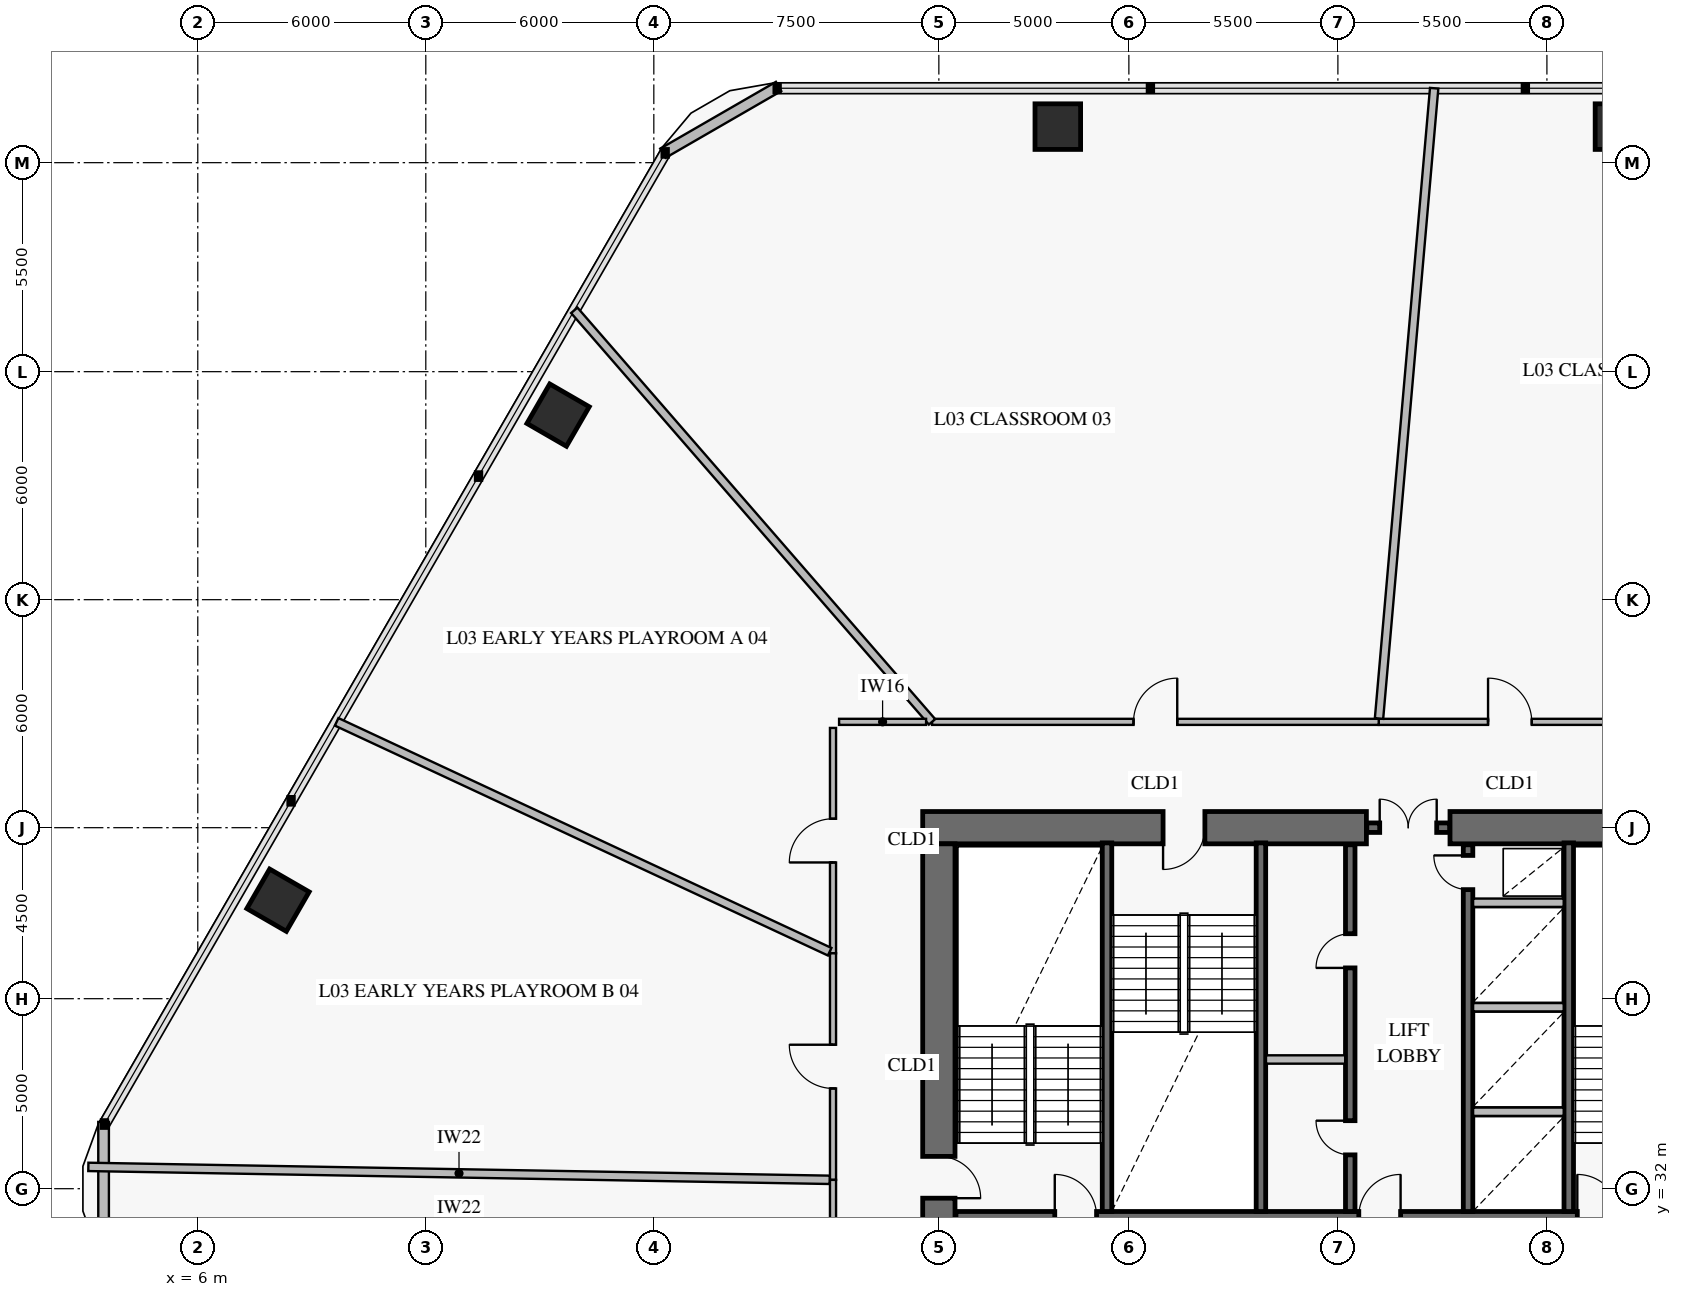
"""IFC4 building model, lengths in metres.
Left out: names, types, materials, properties, quantities, classifications, styles, units other than length and angle.
Written with IfcOpenShell. Run it as: python <this file> out.ifc"""

import sys

from ifc_helpers import new_model, si_unit, direction, frame, frame_2d, origin, origin_2d, place, context, subcontext, project, spatial, rectangle, extrude, element, fill, save


model = new_model("IFC4")
c1 = context("Model", 3, precision=1e-05, world=origin(), true_north=direction((0.0, 1.0)))
c2 = subcontext(c1, "Body", "Model", "MODEL_VIEW")
j1 = project(units=[si_unit("LENGTHUNIT", "METRE"), si_unit("PLANEANGLEUNIT", "RADIAN")], contexts=[c1])
p1 = place(None, origin())
s1 = spatial("IfcSite", under=j1, at=p1, CompositionType="ELEMENT")
p2 = place(p1, origin())
s2 = spatial("IfcBuilding", under=s1, at=p2, CompositionType="ELEMENT")
p3 = place(p2, frame((0.0, 0.0, 12.0)))
s3 = spatial("IfcBuildingStorey", under=s2, at=p3, CompositionType="ELEMENT", Elevation=12.0)
p4 = place(p3, frame((46.925, 41.5, 0.0), z_axis=(0.0, 0.0, 1.0), x_axis=(-1.0, 0.0, 0.0)))
e1 = element("IfcWall", 1, at=p4, inside=s3, PredefinedType="SHEAR", context=c2, shape_type="SweptSolid", body=[
    extrude(rectangle(XDim=7.975, YDim=0.85, at=frame_2d((3.988, 0.0))), origin(), (0.0, 0.0, 1.0), 4.2),
])
p5 = place(p3, frame((36.75, 41.5, 0.0), z_axis=(0.0, 0.0, 1.0), x_axis=(-1.0, 0.0, 0.0)))
e2 = element("IfcWall", 2, at=p5, inside=s3, PredefinedType="SHEAR", context=c2, shape_type="SweptSolid", body=[
    extrude(rectangle(XDim=11.675, YDim=0.85, at=frame_2d((5.837, 0.0))), origin(), (0.0, 0.0, 1.0), 4.2),
])
p6 = place(p5, frame((4.25, 0.0, 0.0)))
e3 = element("IfcOpeningElement", 3, at=p6, cuts=e2, PredefinedType="OPENING", context=c2, shape_type="SweptSolid", body=[
    extrude(rectangle(XDim=1.1, YDim=2.15, at=frame_2d((0.55, 1.075))), frame((0.0, 0.437, 0.0), z_axis=(0.0, -1.0, 0.0), x_axis=(1.0, 0.0, 0.0)), (0.0, 0.0, 1.0), 0.874),
])
p7 = place(p3, frame((25.5, 22.925, 0.0), z_axis=(0.0, 0.0, 1.0), x_axis=(0.0, 1.0, 0.0)))
e4 = element("IfcWall", 4, at=p7, inside=s3, PredefinedType="SHEAR", context=c2, shape_type="SweptSolid", body=[
    extrude(rectangle(XDim=18.15, YDim=0.85, at=frame_2d((9.075, 0.0))), origin(), (0.0, 0.0, 1.0), 4.2),
])
p8 = place(p7, frame((8.825, 0.0, 0.0)))
e5 = element("IfcOpeningElement", 5, at=p8, cuts=e4, PredefinedType="OPENING", context=c2, shape_type="SweptSolid", body=[
    extrude(rectangle(XDim=1.1, YDim=2.15, at=frame_2d((0.55, 1.075))), frame((0.0, 0.437, 0.0), z_axis=(0.0, -1.0, 0.0), x_axis=(1.0, 0.0, 0.0)), (0.0, 0.0, 1.0), 0.874),
])
for number, where, z_axis, x_axis in (
    (6, (43.37, 59.948, 0.0), (0.0, 0.0, 1.0), (-1.0, 0.0, 0.0)),
    (7, (28.63, 59.948, 0.0), (0.0, 0.0, 1.0), (-1.0, 0.0, 0.0)),
    (8, (15.481, 52.357, 0.0), (0.0, 0.0, 1.0), (-0.5, -0.866, 0.0)),
    (9, (8.111, 39.592, 0.0), (0.0, 0.0, 1.0), (-0.5, -0.866, 0.0)),
):
    element("IfcColumn", number, at=place(p3, frame(where, z_axis=z_axis, x_axis=x_axis)), inside=s3, PredefinedType="COLUMN", context=c2, shape_type="SweptSolid", body=[
        extrude(rectangle(XDim=1.2, YDim=1.2, at=origin_2d()), origin(), (0.0, 0.0, 1.0), 3.92),
    ])
p9 = place(p3, frame((3.521, 30.242, 0.0), z_axis=(0.0, 0.0, 1.0), x_axis=(0.0, 1.0, 0.0)))
e10 = element("IfcWall", 10, at=p9, inside=s3, PredefinedType="SOLIDWALL", context=c2, shape_type="SweptSolid", body=[
    extrude(rectangle(XDim=3.515, YDim=0.28, at=frame_2d((1.758, 0.0))), origin(), (0.0, 0.0, 1.0), 3.92),
])
p10 = place(p3, frame((18.239, 59.249, 0.0), z_axis=(0.0, 0.0, 1.0), x_axis=(0.866007452331, 0.500031091541, 0.0)))
e11 = element("IfcWall", 11, at=p10, inside=s3, PredefinedType="SOLIDWALL", context=c2, shape_type="SweptSolid", body=[
    extrude(rectangle(XDim=3.515, YDim=0.28, at=frame_2d((1.757, 0.0))), origin(), (0.0, 0.0, 1.0), 3.92),
])
p11 = place(p3, frame((36.76, 41.5, 0.0), z_axis=(0.0, 0.0, 1.0), x_axis=(1.0, 0.0, 0.0)))
e12 = element("IfcWall", 12, at=p11, inside=s3, PredefinedType="SOLIDWALL", context=c2, shape_type="SweptSolid", body=[
    extrude(rectangle(XDim=2.18, YDim=0.25, at=frame_2d((1.09, 0.0))), origin(), (0.0, 0.0, 1.0), 4.2),
])
p12 = place(p11, frame((0.34, 0.0, 0.0)))
e13 = element("IfcOpeningElement", 13, at=p12, cuts=e12, PredefinedType="OPENING", context=c2, shape_type="SweptSolid", body=[
    extrude(rectangle(XDim=1.5, YDim=2.15, at=frame_2d((0.75, 1.075))), frame((0.0, 0.137, 0.0), z_axis=(0.0, -1.0, 0.0), x_axis=(1.0, 0.0, 0.0)), (0.0, 0.0, 1.0), 0.274),
])
p13 = place(p3, frame((25.95, 31.275, 0.0), z_axis=(0.0, 0.0, 1.0), x_axis=(1.0, 0.0, 0.0)))
e14 = element("IfcWall", 14, at=p13, inside=s3, PredefinedType="SOLIDWALL", context=c2, shape_type="SweptSolid", body=[
    extrude(rectangle(XDim=20.1, YDim=0.25, at=frame_2d((10.05, 0.0))), origin(), (0.0, 0.0, 1.0), 4.2),
])
p14 = place(p13, frame((2.6, 0.0, 0.0)))
e15 = element("IfcOpeningElement", 15, at=p14, cuts=e14, PredefinedType="OPENING", context=c2, shape_type="SweptSolid", body=[
    extrude(rectangle(XDim=1.1, YDim=2.15, at=frame_2d((0.55, 1.075))), frame((0.0, 0.137, 0.0), z_axis=(0.0, -1.0, 0.0), x_axis=(1.0, 0.0, 0.0)), (0.0, 0.0, 1.0), 0.274),
])
p15 = place(p13, frame((10.6, 0.0, 0.0)))
e16 = element("IfcOpeningElement", 16, at=p15, cuts=e14, PredefinedType="OPENING", context=c2, shape_type="SweptSolid", body=[
    extrude(rectangle(XDim=1.1, YDim=2.15, at=frame_2d((0.55, 1.075))), frame((0.0, 0.137, 0.0), z_axis=(0.0, -1.0, 0.0), x_axis=(1.0, 0.0, 0.0)), (0.0, 0.0, 1.0), 0.274),
])
p16 = place(p13, frame((16.35, 0.0, 0.0)))
e17 = element("IfcOpeningElement", 17, at=p16, cuts=e14, PredefinedType="OPENING", context=c2, shape_type="SweptSolid", body=[
    extrude(rectangle(XDim=1.1, YDim=2.15, at=frame_2d((0.55, 1.075))), frame((0.0, 0.137, 0.0), z_axis=(0.0, -1.0, 0.0), x_axis=(1.0, 0.0, 0.0)), (0.0, 0.0, 1.0), 0.274),
])
for number, where, z_axis, x_axis in (
    (18, (29.925, 31.4, 0.0), (0.0, 0.0, 1.0), (0.0, 1.0, 0.0)),
    (19, (33.975, 31.4, 0.0), (0.0, 0.0, 1.0), (0.0, 1.0, 0.0)),
    (20, (42.075, 31.4, 0.0), (0.0, 0.0, 1.0), (0.0, 1.0, 0.0)),
):
    element("IfcWall", number, at=place(p3, frame(where, z_axis=z_axis, x_axis=x_axis)), inside=s3, PredefinedType="SOLIDWALL", context=c2, shape_type="SweptSolid", body=[
        extrude(rectangle(XDim=9.7, YDim=0.25, at=frame_2d((4.85, 0.0))), origin(), (0.0, 0.0, 1.0), 4.2),
    ])
p17 = place(p3, frame((36.325, 31.4, 0.0), z_axis=(0.0, 0.0, 1.0), x_axis=(0.0, 1.0, 0.0)))
e21 = element("IfcWall", 21, at=p17, inside=s3, PredefinedType="SOLIDWALL", context=c2, shape_type="SweptSolid", body=[
    extrude(rectangle(XDim=9.65, YDim=0.25, at=frame_2d((4.825, 0.0))), origin(), (0.0, 0.0, 1.0), 4.2),
])
p18 = place(p17, frame((1.49, 0.0, 0.0)))
e22 = element("IfcOpeningElement", 22, at=p18, cuts=e21, PredefinedType="OPENING", context=c2, shape_type="SweptSolid", body=[
    extrude(rectangle(XDim=0.9, YDim=2.1, at=frame_2d((0.45, 1.05))), frame((0.0, 0.137, 0.0), z_axis=(0.0, -1.0, 0.0), x_axis=(1.0, 0.0, 0.0)), (0.0, 0.0, 1.0), 0.274),
])
p19 = place(p17, frame((6.41, 0.0, 0.0)))
e23 = element("IfcOpeningElement", 23, at=p19, cuts=e21, PredefinedType="OPENING", context=c2, shape_type="SweptSolid", body=[
    extrude(rectangle(XDim=0.9, YDim=2.1, at=frame_2d((0.45, 1.05))), frame((0.0, 0.137, 0.0), z_axis=(0.0, -1.0, 0.0), x_axis=(1.0, 0.0, 0.0)), (0.0, 0.0, 1.0), 0.274),
])
p20 = place(p3, frame((39.425, 31.4, 0.0), z_axis=(0.0, 0.0, 1.0), x_axis=(0.0, 1.0, 0.0)))
e24 = element("IfcWall", 24, at=p20, inside=s3, PredefinedType="SOLIDWALL", context=c2, shape_type="SweptSolid", body=[
    extrude(rectangle(XDim=9.65, YDim=0.25, at=frame_2d((4.825, 0.0))), origin(), (0.0, 0.0, 1.0), 4.2),
])
p21 = place(p20, frame((8.47, 0.0, 0.0)))
e25 = element("IfcOpeningElement", 25, at=p21, cuts=e24, PredefinedType="OPENING", context=c2, shape_type="SweptSolid", body=[
    extrude(rectangle(XDim=0.9, YDim=2.1, at=frame_2d((0.45, 1.05))), frame((0.0, 0.137, 0.0), z_axis=(0.0, -1.0, 0.0), x_axis=(1.0, 0.0, 0.0)), (0.0, 0.0, 1.0), 0.274),
])
p22 = place(p3, frame((43.978, 44.285, 0.0), z_axis=(0.0, 0.0, 1.0), x_axis=(-1.0, 0.0, 0.0)))
e26 = element("IfcWall", 26, at=p22, inside=s3, PredefinedType="PARTITIONING", context=c2, shape_type="SweptSolid", body=[
    extrude(rectangle(XDim=6.903, YDim=0.16, at=frame_2d((3.452, 0.0))), origin(), (0.0, 0.0, 1.0), 3.22),
])
p23 = place(p22, frame((2.877, 0.0, 0.0)))
e27 = element("IfcOpeningElement", 27, at=p23, cuts=e26, PredefinedType="OPENING", context=c2, shape_type="SweptSolid", body=[
    extrude(rectangle(XDim=1.15, YDim=2.2, at=frame_2d((0.575, 1.1))), frame((0.0, 0.092, 0.0), z_axis=(0.0, -1.0, 0.0), x_axis=(1.0, 0.0, 0.0)), (0.0, 0.0, 1.0), 0.184),
])
p24 = place(p3, frame((37.075, 44.285, 0.0), z_axis=(0.0, 0.0, 1.0), x_axis=(-1.0, 0.0, 0.0)))
e28 = element("IfcWall", 28, at=p24, inside=s3, PredefinedType="PARTITIONING", context=c2, shape_type="SweptSolid", body=[
    extrude(rectangle(XDim=11.754, YDim=0.16, at=frame_2d((5.877, 0.0))), origin(), (0.0, 0.0, 1.0), 3.22),
])
p25 = place(p24, frame((5.302, 0.0, 0.0)))
e29 = element("IfcOpeningElement", 29, at=p25, cuts=e28, PredefinedType="OPENING", context=c2, shape_type="SweptSolid", body=[
    extrude(rectangle(XDim=1.15, YDim=2.2, at=frame_2d((0.575, 1.1))), frame((0.0, 0.092, 0.0), z_axis=(0.0, -1.0, 0.0), x_axis=(1.0, 0.0, 0.0)), (0.0, 0.0, 1.0), 0.184),
])
p26 = place(p3, frame((22.715, 44.125, 0.0), z_axis=(0.0, 0.0, 1.0), x_axis=(0.0, -1.0, 0.0)))
e30 = element("IfcWall", 30, at=p26, inside=s3, PredefinedType="PARTITIONING", context=c2, shape_type="SweptSolid", body=[
    extrude(rectangle(XDim=5.93, YDim=0.16, at=frame_2d((2.965, 0.0))), origin(), (0.0, 0.0, 1.0), 3.92),
])
p27 = place(p26, frame((2.39, 0.0, 0.0)))
e31 = element("IfcOpeningElement", 31, at=p27, cuts=e30, PredefinedType="OPENING", context=c2, shape_type="SweptSolid", body=[
    extrude(rectangle(XDim=1.15, YDim=2.2, at=frame_2d((0.575, 1.1))), frame((0.0, 0.092, 0.0), z_axis=(0.0, -1.0, 0.0), x_axis=(1.0, 0.0, 0.0)), (0.0, 0.0, 1.0), 0.184),
])
p28 = place(p3, frame((22.715, 38.195, 0.0), z_axis=(0.0, 0.0, 1.0), x_axis=(0.0, -1.0, 0.0)))
e32 = element("IfcWall", 32, at=p28, inside=s3, PredefinedType="PARTITIONING", context=c2, shape_type="SweptSolid", body=[
    extrude(rectangle(XDim=5.963, YDim=0.16, at=frame_2d((2.981, 0.0))), origin(), (0.0, 0.0, 1.0), 3.22),
])
p29 = place(p28, frame((2.406, 0.0, 0.0)))
e33 = element("IfcOpeningElement", 33, at=p29, cuts=e32, PredefinedType="OPENING", context=c2, shape_type="SweptSolid", body=[
    extrude(rectangle(XDim=1.15, YDim=2.2, at=frame_2d((0.575, 1.1))), frame((0.0, 0.092, 0.0), z_axis=(0.0, -1.0, 0.0), x_axis=(1.0, 0.0, 0.0)), (0.0, 0.0, 1.0), 0.184),
])
p30 = place(p3, frame((22.715, 32.232, 0.0), z_axis=(0.0, 0.0, 1.0), x_axis=(0.0, -1.0, 0.0)))
e34 = element("IfcWall", 34, at=p30, inside=s3, PredefinedType="PARTITIONING", context=c2, shape_type="SweptSolid", body=[
    extrude(rectangle(XDim=5.599, YDim=0.16, at=frame_2d((2.8, 0.0))), origin(), (0.0, 0.0, 1.0), 3.22),
])
p31 = place(p30, frame((2.225, 0.0, 0.0)))
e35 = element("IfcOpeningElement", 35, at=p31, cuts=e34, PredefinedType="OPENING", context=c2, shape_type="SweptSolid", body=[
    extrude(rectangle(XDim=1.15, YDim=2.2, at=frame_2d((0.575, 1.1))), frame((0.0, 0.092, 0.0), z_axis=(0.0, -1.0, 0.0), x_axis=(1.0, 0.0, 0.0)), (0.0, 0.0, 1.0), 0.184),
])
p32 = place(p3, frame((34.108, 35.4, 0.0), z_axis=(0.0, 0.0, 1.0), x_axis=(1.0, 0.0, 0.0)))
e36 = element("IfcWall", 36, at=p32, inside=s3, PredefinedType="PARTITIONING", context=c2, shape_type="SweptSolid", body=[
    extrude(rectangle(XDim=2.084, YDim=0.22, at=frame_2d((1.042, 0.0))), origin(), (0.0, 0.0, 1.0), 3.92),
])
for number, where, z_axis, x_axis in (
    (37, (39.558, 34.025, 0.0), (0.0, 0.0, 1.0), (1.0, 0.0, 0.0)),
    (38, (39.558, 36.775, 0.0), (0.0, 0.0, 1.0), (1.0, 0.0, 0.0)),
    (39, (39.558, 39.525, 0.0), (0.0, 0.0, 1.0), (1.0, 0.0, 0.0)),
):
    element("IfcWall", number, at=place(p3, frame(where, z_axis=z_axis, x_axis=x_axis)), inside=s3, PredefinedType="PARTITIONING", context=c2, shape_type="SweptSolid", body=[
        extrude(rectangle(XDim=2.384, YDim=0.22, at=frame_2d((1.192, 0.0))), origin(), (0.0, 0.0, 1.0), 3.92),
    ])
p33 = place(p3, frame((37.083, 44.373, 0.0), z_axis=(0.0, 0.0, 1.0), x_axis=(0.087149123156, 0.996195277209, 0.0)))
e40 = element("IfcWall", 40, at=p33, inside=s3, PredefinedType="PARTITIONING", context=c2, shape_type="SweptSolid", body=[
    extrude(rectangle(XDim=16.649, YDim=0.22, at=frame_2d((8.324, 0.0))), origin(), (0.0, 0.0, 1.0), 3.17),
])
p34 = place(p3, frame((25.321, 44.285, 0.0), z_axis=(0.0, 0.0, 1.0), x_axis=(-0.656060762546, 0.754708073263, 0.0)))
e41 = element("IfcWall", 41, at=p34, inside=s3, PredefinedType="PARTITIONING", context=c2, shape_type="SweptSolid", body=[
    extrude(rectangle(XDim=14.349, YDim=0.22, at=frame_2d((7.175, 0.0))), origin(), (0.0, 0.0, 1.0), 3.17),
])
p35 = place(p3, frame((22.627, 38.236, 0.0), z_axis=(0.0, 0.0, 1.0), x_axis=(-0.906309468756, 0.422614655263, 0.0)))
e42 = element("IfcWall", 42, at=p35, inside=s3, PredefinedType="PARTITIONING", context=c2, shape_type="SweptSolid", body=[
    extrude(rectangle(XDim=14.313, YDim=0.22, at=frame_2d((7.157, 0.0))), origin(), (0.0, 0.0, 1.0), 3.17),
])
p36 = place(p3, frame((25.164, 44.285, 0.0), z_axis=(0.0, 0.0, 1.0), x_axis=(-1.0, 0.0, 0.0)))
e43 = element("IfcWall", 43, at=p36, inside=s3, PredefinedType="PARTITIONING", context=c2, shape_type="SweptSolid", body=[
    extrude(rectangle(XDim=2.289, YDim=0.16, at=frame_2d((1.145, 0.0))), origin(), (0.0, 0.0, 1.0), 3.22),
])
p37 = place(p3, frame((22.627, 32.233, 0.0), z_axis=(0.0, 0.0, 1.0), x_axis=(-0.999847613209, 0.017457100559, 0.0)))
e44 = element("IfcWall", 44, at=p37, inside=s3, PredefinedType="PARTITIONING", context=c2, shape_type="SweptSolid", body=[
    extrude(rectangle(XDim=19.509, YDim=0.22, at=frame_2d((9.755, 0.0))), origin(), (0.0, 0.0, 1.0), 3.17),
])
p38 = place(p8, frame((1.1, 0.0, 0.0), z_axis=(0.0, 0.0, 1.0), x_axis=(-1.0, 0.0, 0.0)))
e45 = element("IfcDoor", 45, at=p38, inside=s3, OperationType="SINGLE_SWING_RIGHT", PredefinedType="USERDEFINED", context=c2, shape_type="SweptSolid", body=[
    extrude(rectangle(XDim=1.1, YDim=2.15, at=frame_2d((0.55, 1.075))), frame((0.0, 0.025, 0.0), z_axis=(0.0, -1.0, 0.0), x_axis=(1.0, 0.0, 0.0)), (0.0, 0.0, 1.0), 0.05),
])
fill(e5, e45)
p39 = place(p6, origin())
e46 = element("IfcDoor", 46, at=p39, inside=s3, OperationType="SINGLE_SWING_RIGHT", PredefinedType="USERDEFINED", context=c2, shape_type="SweptSolid", body=[
    extrude(rectangle(XDim=1.1, YDim=2.15, at=frame_2d((0.55, 1.075))), frame((0.0, 0.025, 0.0), z_axis=(0.0, -1.0, 0.0), x_axis=(1.0, 0.0, 0.0)), (0.0, 0.0, 1.0), 0.05),
])
fill(e3, e46)
p40 = place(p12, origin())
e47 = element("IfcDoor", 47, at=p40, inside=s3, OperationType="DOUBLE_DOOR_SINGLE_SWING", PredefinedType="DOOR", context=c2, shape_type="SweptSolid", body=[
    extrude(rectangle(XDim=1.5, YDim=2.15, at=frame_2d((0.75, 1.075))), frame((0.0, 0.025, 0.0), z_axis=(0.0, -1.0, 0.0), x_axis=(1.0, 0.0, 0.0)), (0.0, 0.0, 1.0), 0.05),
])
fill(e13, e47)
p41 = place(p14, origin())
e48 = element("IfcDoor", 48, at=p41, inside=s3, OperationType="SINGLE_SWING_LEFT", PredefinedType="USERDEFINED", context=c2, shape_type="SweptSolid", body=[
    extrude(rectangle(XDim=1.1, YDim=2.15, at=frame_2d((0.55, 1.075))), frame((0.0, 0.025, 0.0), z_axis=(0.0, -1.0, 0.0), x_axis=(1.0, 0.0, 0.0)), (0.0, 0.0, 1.0), 0.05),
])
fill(e15, e48)
p42 = place(p15, origin())
e49 = element("IfcDoor", 49, at=p42, inside=s3, OperationType="SINGLE_SWING_RIGHT", PredefinedType="USERDEFINED", context=c2, shape_type="SweptSolid", body=[
    extrude(rectangle(XDim=1.1, YDim=2.15, at=frame_2d((0.55, 1.075))), frame((0.0, 0.025, 0.0), z_axis=(0.0, -1.0, 0.0), x_axis=(1.0, 0.0, 0.0)), (0.0, 0.0, 1.0), 0.05),
])
fill(e16, e49)
p43 = place(p16, origin())
e50 = element("IfcDoor", 50, at=p43, inside=s3, OperationType="SINGLE_SWING_LEFT", PredefinedType="USERDEFINED", context=c2, shape_type="SweptSolid", body=[
    extrude(rectangle(XDim=1.1, YDim=2.15, at=frame_2d((0.55, 1.075))), frame((0.0, 0.025, 0.0), z_axis=(0.0, -1.0, 0.0), x_axis=(1.0, 0.0, 0.0)), (0.0, 0.0, 1.0), 0.05),
])
fill(e17, e50)
p44 = place(p18, origin())
e51 = element("IfcDoor", 51, at=p44, inside=s3, OperationType="SINGLE_SWING_RIGHT", PredefinedType="DOOR", context=c2, shape_type="SweptSolid", body=[
    extrude(rectangle(XDim=0.9, YDim=2.1, at=frame_2d((0.45, 1.05))), frame((0.0, 0.025, 0.0), z_axis=(0.0, -1.0, 0.0), x_axis=(1.0, 0.0, 0.0)), (0.0, 0.0, 1.0), 0.05),
])
fill(e22, e51)
p45 = place(p19, origin())
e52 = element("IfcDoor", 52, at=p45, inside=s3, OperationType="SINGLE_SWING_LEFT", PredefinedType="DOOR", context=c2, shape_type="SweptSolid", body=[
    extrude(rectangle(XDim=0.9, YDim=2.1, at=frame_2d((0.45, 1.05))), frame((0.0, 0.025, 0.0), z_axis=(0.0, -1.0, 0.0), x_axis=(1.0, 0.0, 0.0)), (0.0, 0.0, 1.0), 0.05),
])
fill(e23, e52)
p46 = place(p21, origin())
e53 = element("IfcDoor", 53, at=p46, inside=s3, OperationType="SINGLE_SWING_RIGHT", PredefinedType="DOOR", context=c2, shape_type="SweptSolid", body=[
    extrude(rectangle(XDim=0.9, YDim=2.1, at=frame_2d((0.45, 1.05))), frame((0.0, 0.025, 0.0), z_axis=(0.0, -1.0, 0.0), x_axis=(1.0, 0.0, 0.0)), (0.0, 0.0, 1.0), 0.05),
])
fill(e25, e53)
p47 = place(p23, frame((1.15, 0.0, 0.0), z_axis=(0.0, 0.0, 1.0), x_axis=(-1.0, 0.0, 0.0)))
e54 = element("IfcDoor", 54, at=p47, inside=s3, OperationType="SINGLE_SWING_LEFT", PredefinedType="DOOR", context=c2, shape_type="SweptSolid", body=[
    extrude(rectangle(XDim=1.15, YDim=2.2, at=frame_2d((0.575, 1.1))), frame((0.0, 0.025, 0.0), z_axis=(0.0, -1.0, 0.0), x_axis=(1.0, 0.0, 0.0)), (0.0, 0.0, 1.0), 0.05),
])
fill(e27, e54)
p48 = place(p25, frame((1.15, 0.0, 0.0), z_axis=(0.0, 0.0, 1.0), x_axis=(-1.0, 0.0, 0.0)))
e55 = element("IfcDoor", 55, at=p48, inside=s3, OperationType="SINGLE_SWING_RIGHT", PredefinedType="DOOR", context=c2, shape_type="SweptSolid", body=[
    extrude(rectangle(XDim=1.15, YDim=2.2, at=frame_2d((0.575, 1.1))), frame((0.0, 0.025, 0.0), z_axis=(0.0, -1.0, 0.0), x_axis=(1.0, 0.0, 0.0)), (0.0, 0.0, 1.0), 0.05),
])
fill(e29, e55)
p49 = place(p27, frame((1.15, 0.0, 0.0), z_axis=(0.0, 0.0, 1.0), x_axis=(-1.0, 0.0, 0.0)))
e56 = element("IfcDoor", 56, at=p49, inside=s3, OperationType="SINGLE_SWING_LEFT", PredefinedType="DOOR", context=c2, shape_type="SweptSolid", body=[
    extrude(rectangle(XDim=1.15, YDim=2.2, at=frame_2d((0.575, 1.1))), frame((0.0, 0.025, 0.0), z_axis=(0.0, -1.0, 0.0), x_axis=(1.0, 0.0, 0.0)), (0.0, 0.0, 1.0), 0.05),
])
fill(e31, e56)
p50 = place(p29, frame((1.15, 0.0, 0.0), z_axis=(0.0, 0.0, 1.0), x_axis=(-1.0, 0.0, 0.0)))
e57 = element("IfcDoor", 57, at=p50, inside=s3, OperationType="SINGLE_SWING_RIGHT", PredefinedType="DOOR", context=c2, shape_type="SweptSolid", body=[
    extrude(rectangle(XDim=1.15, YDim=2.2, at=frame_2d((0.575, 1.1))), frame((0.0, 0.025, 0.0), z_axis=(0.0, -1.0, 0.0), x_axis=(1.0, 0.0, 0.0)), (0.0, 0.0, 1.0), 0.05),
])
fill(e33, e57)
save(model, sys.argv[1])
